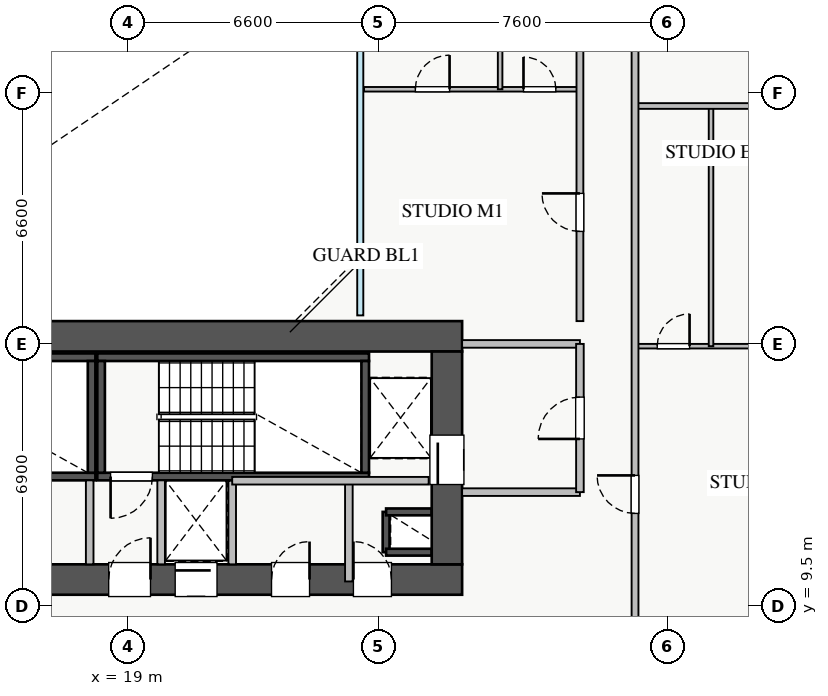
"""IFC4 building model, lengths in metres.
Left out: names, types, materials, properties, quantities, classifications, styles, units other than length and angle.
Written with IfcOpenShell. Run it as: python <this file> out.ifc"""

import sys

from ifc_helpers import new_model, si_unit, direction, frame, frame_2d, origin, place, context, subcontext, project, spatial, rectangle, extrude, source, transform, mapped, element, fill, save


model = new_model("IFC4")
c1 = context("Model", 3, precision=1e-05, world=origin(), true_north=direction((0.0, 1.0)))
c2 = subcontext(c1, "Body", "Model", "MODEL_VIEW")
j1 = project(units=[si_unit("LENGTHUNIT", "METRE"), si_unit("PLANEANGLEUNIT", "RADIAN")], contexts=[c1])
p1 = place(None, origin())
s1 = spatial("IfcSite", under=j1, at=p1, CompositionType="ELEMENT")
p2 = place(p1, origin())
s2 = spatial("IfcBuilding", under=s1, at=p2, CompositionType="ELEMENT")
p3 = place(p2, frame((0.0, 0.0, 89.25)))
s3 = spatial("IfcBuildingStorey", under=s2, at=p3, CompositionType="ELEMENT", Elevation=89.25)
p4 = place(p3, frame((25.8, 10.92, 0.0), z_axis=(0.0, 0.0, 1.0), x_axis=(0.0, 1.0, 0.0)))
e1 = element("IfcWall", 1, at=p4, inside=s3, PredefinedType="SHEAR", context=c2, shape_type="SweptSolid", body=[
    extrude(rectangle(XDim=1.06, YDim=0.18, at=frame_2d((0.53, 0.0))), origin(), (0.0, 0.0, 1.0), 3.03),
])
for number, where, z_axis, x_axis in (
    (2, (25.8, 11.98, 0.0), (0.0, 0.0, 1.0), (1.0, 0.0, 0.0)),
    (3, (25.8, 10.92, 0.0), (0.0, 0.0, 1.0), (1.0, 0.0, 0.0)),
):
    element("IfcWall", number, at=place(p3, frame(where, z_axis=z_axis, x_axis=x_axis)), inside=s3, PredefinedType="SHEAR", context=c2, shape_type="SweptSolid", body=[
        extrude(rectangle(XDim=1.2, YDim=0.18, at=frame_2d((0.6, 0.0))), origin(), (0.0, 0.0, 1.0), 3.03),
    ])
p5 = place(p3, frame((19.88, 12.8, 0.0), z_axis=(0.0, 0.0, 1.0), x_axis=(1.0, 0.0, 0.0)))
e4 = element("IfcWall", 4, at=p5, inside=s3, PredefinedType="SHEAR", context=c2, shape_type="SweptSolid", body=[
    extrude(rectangle(XDim=1.87, YDim=0.18, at=frame_2d((0.935, 0.0))), origin(), (0.0, 0.0, 1.0), 3.03),
])
p6 = place(p3, frame((11.0, 12.91, 0.0), z_axis=(0.0, 0.0, 1.0), x_axis=(1.0, 0.0, 0.0)))
e5 = element("IfcWall", 5, at=p6, inside=s3, PredefinedType="SHEAR", context=c2, shape_type="SweptSolid", body=[
    extrude(rectangle(XDim=7.15, YDim=0.2, at=frame_2d((3.575, 0.0))), origin(), (0.0, 0.0, 1.0), 3.25),
])
p7 = place(p6, frame((0.35, 0.0, 0.0)))
e6 = element("IfcOpeningElement", 6, at=p7, cuts=e5, PredefinedType="OPENING", context=c2, shape_type="SweptSolid", body=[
    extrude(rectangle(XDim=1.1, YDim=2.05, at=frame_2d((0.55, 1.025))), frame((0.0, 0.11, 0.0), z_axis=(0.0, -1.0, 0.0), x_axis=(1.0, 0.0, 0.0)), (0.0, 0.0, 1.0), 0.22),
])
p8 = place(p3, frame((11.0, 16.05, 0.0), z_axis=(0.0, 0.0, 1.0), x_axis=(1.0, 0.0, 0.0)))
e7 = element("IfcWall", 7, at=p8, inside=s3, PredefinedType="SHEAR", context=c2, shape_type="SweptSolid", body=[
    extrude(rectangle(XDim=7.15, YDim=0.2, at=frame_2d((3.575, 0.0))), origin(), (0.0, 0.0, 1.0), 3.25),
])
p9 = place(p3, frame((18.05, 13.01, 0.0), z_axis=(0.0, 0.0, 1.0), x_axis=(0.0, 1.0, 0.0)))
e8 = element("IfcWall", 8, at=p9, inside=s3, PredefinedType="SHEAR", context=c2, shape_type="SweptSolid", body=[
    extrude(rectangle(XDim=2.94, YDim=0.2, at=frame_2d((1.47, 0.0))), origin(), (0.0, 0.0, 1.0), 3.25),
])
p10 = place(p3, frame((18.2, 12.91, 0.0), z_axis=(0.0, 0.0, 1.0), x_axis=(1.0, 0.0, 0.0)))
e9 = element("IfcWall", 9, at=p10, inside=s3, PredefinedType="SHEAR", context=c2, shape_type="SweptSolid", body=[
    extrude(rectangle(XDim=7.15, YDim=0.2, at=frame_2d((3.575, 0.0))), origin(), (0.0, 0.0, 1.0), 3.25),
])
p11 = place(p10, frame((0.35, 0.0, 0.0)))
e10 = element("IfcOpeningElement", 10, at=p11, cuts=e9, PredefinedType="OPENING", context=c2, shape_type="SweptSolid", body=[
    extrude(rectangle(XDim=1.1, YDim=2.05, at=frame_2d((0.55, 1.025))), frame((0.0, 0.11, 0.0), z_axis=(0.0, -1.0, 0.0), x_axis=(1.0, 0.0, 0.0)), (0.0, 0.0, 1.0), 0.22),
])
p12 = place(p3, frame((18.2, 16.05, 0.0), z_axis=(0.0, 0.0, 1.0), x_axis=(1.0, 0.0, 0.0)))
e11 = element("IfcWall", 11, at=p12, inside=s3, PredefinedType="SHEAR", context=c2, shape_type="SweptSolid", body=[
    extrude(rectangle(XDim=7.15, YDim=0.2, at=frame_2d((3.575, 0.0))), origin(), (0.0, 0.0, 1.0), 3.25),
])
for number, where, z_axis, x_axis in (
    (12, (18.3, 13.01, 0.0), (0.0, 0.0, 1.0), (0.0, 1.0, 0.0)),
    (13, (25.25, 13.01, 0.0), (0.0, 0.0, 1.0), (0.0, 1.0, 0.0)),
):
    element("IfcWall", number, at=place(p3, frame(where, z_axis=z_axis, x_axis=x_axis)), inside=s3, PredefinedType="SHEAR", context=c2, shape_type="SweptSolid", body=[
        extrude(rectangle(XDim=2.94, YDim=0.2, at=frame_2d((1.47, 0.0))), origin(), (0.0, 0.0, 1.0), 3.25),
    ])
p13 = place(p3, frame((10.2, 10.2, 0.0), z_axis=(0.0, 0.0, 1.0), x_axis=(1.0, 0.0, 0.0)))
e14 = element("IfcWall", 14, at=p13, inside=s3, PredefinedType="SHEAR", context=c2, shape_type="SweptSolid", body=[
    extrude(rectangle(XDim=17.6, YDim=0.8, at=frame_2d((8.8, 0.0))), origin(), (0.0, 0.0, 1.0), 3.25),
])
p14 = place(p13, frame((1.15, 0.0, 0.0)))
e15 = element("IfcOpeningElement", 15, at=p14, cuts=e14, PredefinedType="OPENING", context=c2, shape_type="SweptSolid", body=[
    extrude(rectangle(XDim=1.1, YDim=2.05, at=frame_2d((0.55, 1.025))), frame((0.0, 0.41, 0.0), z_axis=(0.0, -1.0, 0.0), x_axis=(1.0, 0.0, 0.0)), (0.0, 0.0, 1.0), 0.82),
])
p15 = place(p13, frame((8.3, 0.0, 0.0)))
e16 = element("IfcOpeningElement", 16, at=p15, cuts=e14, PredefinedType="OPENING", context=c2, shape_type="SweptSolid", body=[
    extrude(rectangle(XDim=1.1, YDim=2.05, at=frame_2d((0.55, 1.025))), frame((0.0, 0.41, 0.0), z_axis=(0.0, -1.0, 0.0), x_axis=(1.0, 0.0, 0.0)), (0.0, 0.0, 1.0), 0.82),
])
p16 = place(p13, frame((10.05, 0.0, 0.0)))
e17 = element("IfcOpeningElement", 17, at=p16, cuts=e14, PredefinedType="OPENING", context=c2, shape_type="SweptSolid", body=[
    extrude(rectangle(XDim=1.1, YDim=2.05, at=frame_2d((0.55, 1.025))), frame((0.0, 0.41, 0.0), z_axis=(0.0, -1.0, 0.0), x_axis=(1.0, 0.0, 0.0)), (0.0, 0.0, 1.0), 0.82),
])
p17 = place(p13, frame((14.74, 0.0, 0.0)))
e18 = element("IfcOpeningElement", 18, at=p17, cuts=e14, PredefinedType="OPENING", context=c2, shape_type="SweptSolid", body=[
    extrude(rectangle(XDim=1.0, YDim=2.05, at=frame_2d((0.5, 1.025))), frame((0.0, 0.41, 0.0), z_axis=(0.0, -1.0, 0.0), x_axis=(1.0, 0.0, 0.0)), (0.0, 0.0, 1.0), 0.82),
])
p18 = place(p13, frame((12.585, 0.0, 0.0)))
e19 = element("IfcOpeningElement", 19, at=p18, cuts=e14, PredefinedType="OPENING", context=c2, shape_type="SweptSolid", body=[
    extrude(rectangle(XDim=1.0, YDim=2.05, at=frame_2d((0.5, 1.025))), frame((0.0, 0.41, 0.0), z_axis=(0.0, -1.0, 0.0), x_axis=(1.0, 0.0, 0.0)), (0.0, 0.0, 1.0), 0.82),
])
p19 = place(p3, frame((10.2, 16.6, 0.0), z_axis=(0.0, 0.0, 1.0), x_axis=(1.0, 0.0, 0.0)))
e20 = element("IfcWall", 20, at=p19, inside=s3, PredefinedType="SHEAR", context=c2, shape_type="SweptSolid", body=[
    extrude(rectangle(XDim=17.6, YDim=0.8, at=frame_2d((8.8, 0.0))), origin(), (0.0, 0.0, 1.0), 3.25),
])
p20 = place(p3, frame((27.4, 10.6, 0.0), z_axis=(0.0, 0.0, 1.0), x_axis=(0.0, 1.0, 0.0)))
e21 = element("IfcWall", 21, at=p20, inside=s3, PredefinedType="SHEAR", context=c2, shape_type="SweptSolid", body=[
    extrude(rectangle(XDim=5.6, YDim=0.8, at=frame_2d((2.8, 0.0))), origin(), (0.0, 0.0, 1.0), 3.25),
])
p21 = place(p20, frame((2.1, 0.0, 0.0)))
e22 = element("IfcOpeningElement", 22, at=p21, cuts=e21, PredefinedType="OPENING", context=c2, shape_type="SweptSolid", body=[
    extrude(rectangle(XDim=1.3, YDim=2.05, at=frame_2d((0.65, 1.025))), frame((0.0, 0.41, 0.0), z_axis=(0.0, -1.0, 0.0), x_axis=(1.0, 0.0, 0.0)), (0.0, 0.0, 1.0), 0.82),
])
for number, where, z_axis, x_axis in (
    (23, (27.8, 16.4, 0.0), (0.0, 0.0, 1.0), (1.0, 0.0, 0.0)),
    (24, (27.8, 12.5, 0.0), (0.0, 0.0, 1.0), (1.0, 0.0, 0.0)),
):
    element("IfcWall", number, at=place(p3, frame(where, z_axis=z_axis, x_axis=x_axis)), inside=s3, PredefinedType="PARTITIONING", context=c2, shape_type="SweptSolid", body=[
        extrude(rectangle(XDim=3.1, YDim=0.2, at=frame_2d((1.55, 0.0))), origin(), (0.0, 0.0, 1.0), 3.03),
    ])
p22 = place(p3, frame((30.9, 12.5, 0.0), z_axis=(0.0, 0.0, 1.0), x_axis=(0.0, 1.0, 0.0)))
e25 = element("IfcWall", 25, at=p22, inside=s3, PredefinedType="PARTITIONING", context=c2, shape_type="SweptSolid", body=[
    extrude(rectangle(XDim=3.9, YDim=0.2, at=frame_2d((1.95, 0.0))), origin(), (0.0, 0.0, 1.0), 3.03),
])
p23 = place(p22, frame((1.4, 0.0, 0.0)))
e26 = element("IfcOpeningElement", 26, at=p23, cuts=e25, PredefinedType="OPENING", context=c2, shape_type="SweptSolid", body=[
    extrude(rectangle(XDim=1.1, YDim=2.05, at=frame_2d((0.55, 1.025))), frame((0.0, 0.11, 0.0), z_axis=(0.0, -1.0, 0.0), x_axis=(1.0, 0.0, 0.0)), (0.0, 0.0, 1.0), 0.22),
])
for number, where, z_axis, x_axis in (
    (27, (18.0, 10.6, 0.0), (0.0, 0.0, 1.0), (0.0, 1.0, 0.0)),
    (28, (19.88, 10.6, 0.0), (0.0, 0.0, 1.0), (0.0, 1.0, 0.0)),
):
    element("IfcWall", number, at=place(p3, frame(where, z_axis=z_axis, x_axis=x_axis)), inside=s3, PredefinedType="PARTITIONING", context=c2, shape_type="SweptSolid", body=[
        extrude(rectangle(XDim=2.21, YDim=0.2, at=frame_2d((1.105, 0.0))), origin(), (0.0, 0.0, 1.0), 3.03),
    ])
p24 = place(p3, frame((24.82, 10.15, 0.0), z_axis=(0.0, 0.0, 1.0), x_axis=(0.0, 1.0, 0.0)))
e29 = element("IfcWall", 29, at=p24, inside=s3, PredefinedType="PARTITIONING", context=c2, shape_type="SweptSolid", body=[
    extrude(rectangle(XDim=2.65, YDim=0.2, at=frame_2d((1.325, 0.0))), origin(), (0.0, 0.0, 1.0), 3.03),
])
p25 = place(p3, frame((21.75, 10.6, 0.0), z_axis=(0.0, 0.0, 1.0), x_axis=(0.0, 1.0, 0.0)))
e30 = element("IfcWall", 30, at=p25, inside=s3, PredefinedType="PARTITIONING", context=c2, shape_type="SweptSolid", body=[
    extrude(rectangle(XDim=2.2, YDim=0.2, at=frame_2d((1.1, 0.0))), origin(), (0.0, 0.0, 1.0), 3.03),
])
p26 = place(p3, frame((21.75, 12.8, 0.0), z_axis=(0.0, 0.0, 1.0), x_axis=(1.0, 0.0, 0.0)))
e31 = element("IfcWall", 31, at=p26, inside=s3, PredefinedType="PARTITIONING", context=c2, shape_type="SweptSolid", body=[
    extrude(rectangle(XDim=5.17, YDim=0.2, at=frame_2d((2.585, 0.0))), origin(), (0.0, 0.0, 1.0), 3.03),
])
p27 = place(p3, frame((32.35, 16.34, 0.0), z_axis=(0.0, 0.0, 1.0), x_axis=(1.0, 0.0, 0.0)))
e32 = element("IfcWall", 32, at=p27, inside=s3, PredefinedType="PLUMBINGWALL", context=c2, shape_type="SweptSolid", body=[
    extrude(rectangle(XDim=5.4, YDim=0.12, at=frame_2d((2.7, 0.0))), origin(), (0.0, 0.0, 1.0), 3.03),
])
p28 = place(p27, frame((0.585, 0.0, 0.0)))
e33 = element("IfcOpeningElement", 33, at=p28, cuts=e32, PredefinedType="OPENING", context=c2, shape_type="SweptSolid", body=[
    extrude(rectangle(XDim=0.85, YDim=2.05, at=frame_2d((0.425, 1.025))), frame((0.0, 0.07, 0.0), z_axis=(0.0, -1.0, 0.0), x_axis=(1.0, 0.0, 0.0)), (0.0, 0.0, 1.0), 0.14),
])
p29 = place(p27, frame((3.24, 0.0, 0.0)))
e34 = element("IfcOpeningElement", 34, at=p29, cuts=e32, PredefinedType="OPENING", context=c2, shape_type="SweptSolid", body=[
    extrude(rectangle(XDim=0.9, YDim=2.05, at=frame_2d((0.45, 1.025))), frame((0.0, 0.07, 0.0), z_axis=(0.0, -1.0, 0.0), x_axis=(1.0, 0.0, 0.0)), (0.0, 0.0, 1.0), 0.14),
])
p30 = place(p3, frame((34.35, 16.34, 0.0), z_axis=(0.0, 0.0, 1.0), x_axis=(0.0, 1.0, 0.0)))
e35 = element("IfcWall", 35, at=p30, inside=s3, PredefinedType="PLUMBINGWALL", context=c2, shape_type="SweptSolid", body=[
    extrude(rectangle(XDim=6.32, YDim=0.12, at=frame_2d((3.16, 0.0))), origin(), (0.0, 0.0, 1.0), 3.03),
])
p31 = place(p3, frame((32.35, 22.66, 0.0), z_axis=(0.0, 0.0, 1.0), x_axis=(1.0, 0.0, 0.0)))
e36 = element("IfcWall", 36, at=p31, inside=s3, PredefinedType="PARTITIONING", context=c2, shape_type="SweptSolid", body=[
    extrude(rectangle(XDim=5.4, YDim=0.15, at=frame_2d((2.7, 0.0))), origin(), (0.0, 0.0, 1.0), 3.03),
])
p32 = place(p3, frame((32.35, 7.21, 0.0), z_axis=(0.0, 0.0, 1.0), x_axis=(0.0, 1.0, 0.0)))
e37 = element("IfcWall", 37, at=p32, inside=s3, PredefinedType="PARTITIONING", context=c2, shape_type="SweptSolid", body=[
    extrude(rectangle(XDim=31.23, YDim=0.18, at=frame_2d((15.615, 0.0))), origin(), (0.0, 0.0, 1.0), 2.725),
])
p33 = place(p32, frame((30.09, 0.0, 0.0)))
e38 = element("IfcOpeningElement", 38, at=p33, cuts=e37, PredefinedType="OPENING", context=c2, shape_type="SweptSolid", body=[
    extrude(rectangle(XDim=0.9, YDim=2.05, at=frame_2d((0.45, 1.025))), frame((0.0, 0.1, 0.0), z_axis=(0.0, -1.0, 0.0), x_axis=(1.0, 0.0, 0.0)), (0.0, 0.0, 1.0), 0.2),
])
p34 = place(p32, frame((0.415, 0.0, 0.0)))
e39 = element("IfcOpeningElement", 39, at=p34, cuts=e37, PredefinedType="OPENING", context=c2, shape_type="SweptSolid", body=[
    extrude(rectangle(XDim=0.9, YDim=2.05, at=frame_2d((0.45, 1.025))), frame((0.0, 0.1, 0.0), z_axis=(0.0, -1.0, 0.0), x_axis=(1.0, 0.0, 0.0)), (0.0, 0.0, 1.0), 0.2),
])
p35 = place(p32, frame((4.73, 0.0, 0.0)))
e40 = element("IfcOpeningElement", 40, at=p35, cuts=e37, PredefinedType="OPENING", context=c2, shape_type="SweptSolid", body=[
    extrude(rectangle(XDim=1.0, YDim=2.05, at=frame_2d((0.5, 1.025))), frame((0.0, 0.1, 0.0), z_axis=(0.0, -1.0, 0.0), x_axis=(1.0, 0.0, 0.0)), (0.0, 0.0, 1.0), 0.2),
])
p36 = place(p32, frame((18.655, 0.0, 0.0)))
e41 = element("IfcOpeningElement", 41, at=p36, cuts=e37, PredefinedType="OPENING", context=c2, shape_type="SweptSolid", body=[
    extrude(rectangle(XDim=1.0, YDim=2.05, at=frame_2d((0.5, 1.025))), frame((0.0, 0.1, 0.0), z_axis=(0.0, -1.0, 0.0), x_axis=(1.0, 0.0, 0.0)), (0.0, 0.0, 1.0), 0.2),
])
p37 = place(p3, frame((25.22, 23.1, 0.0), z_axis=(0.0, 0.0, 1.0), x_axis=(1.0, 0.0, 0.0)))
e42 = element("IfcWall", 42, at=p37, inside=s3, PredefinedType="PLUMBINGWALL", context=c2, shape_type="SweptSolid", body=[
    extrude(rectangle(XDim=5.68, YDim=0.12, at=frame_2d((2.84, 0.0))), origin(), (0.0, 0.0, 1.0), 3.03),
])
p38 = place(p37, frame((1.35, 0.0, 0.0)))
e43 = element("IfcOpeningElement", 43, at=p38, cuts=e42, PredefinedType="OPENING", context=c2, shape_type="SweptSolid", body=[
    extrude(rectangle(XDim=0.9, YDim=2.05, at=frame_2d((0.45, 1.025))), frame((0.0, 0.07, 0.0), z_axis=(0.0, -1.0, 0.0), x_axis=(1.0, 0.0, 0.0)), (0.0, 0.0, 1.0), 0.14),
])
p39 = place(p37, frame((4.195, 0.0, 0.0)))
e44 = element("IfcOpeningElement", 44, at=p39, cuts=e42, PredefinedType="OPENING", context=c2, shape_type="SweptSolid", body=[
    extrude(rectangle(XDim=0.85, YDim=2.05, at=frame_2d((0.425, 1.025))), frame((0.0, 0.07, 0.0), z_axis=(0.0, -1.0, 0.0), x_axis=(1.0, 0.0, 0.0)), (0.0, 0.0, 1.0), 0.14),
])
p40 = place(p3, frame((28.8, 23.1, 0.0), z_axis=(0.0, 0.0, 1.0), x_axis=(0.0, 1.0, 0.0)))
e45 = element("IfcWall", 45, at=p40, inside=s3, PredefinedType="PLUMBINGWALL", context=c2, shape_type="SweptSolid", body=[
    extrude(rectangle(XDim=5.9, YDim=0.12, at=frame_2d((2.95, 0.0))), origin(), (0.0, 0.0, 1.0), 3.03),
])
p41 = place(p3, frame((30.9, 17.0, 0.0), z_axis=(0.0, 0.0, 1.0), x_axis=(0.0, 1.0, 0.0)))
e46 = element("IfcWall", 46, at=p41, inside=s3, PredefinedType="PARTITIONING", context=c2, shape_type="SweptSolid", body=[
    extrude(rectangle(XDim=12.0, YDim=0.18, at=frame_2d((6.0, 0.0))), origin(), (0.0, 0.0, 1.0), 3.03),
])
p42 = place(p41, frame((2.36, 0.0, 0.0)))
e47 = element("IfcOpeningElement", 47, at=p42, cuts=e46, PredefinedType="OPENING", context=c2, shape_type="SweptSolid", body=[
    extrude(rectangle(XDim=1.0, YDim=2.05, at=frame_2d((0.5, 1.025))), frame((0.0, 0.1, 0.0), z_axis=(0.0, -1.0, 0.0), x_axis=(1.0, 0.0, 0.0)), (0.0, 0.0, 1.0), 0.2),
])
m1 = source(origin(), c2, "Body", "SweptSolid", [
    extrude(rectangle(XDim=1.3, YDim=2.05, at=frame_2d((0.65, 1.025))), frame((0.0, 0.025, 0.0), z_axis=(0.0, -1.0, 0.0), x_axis=(1.0, 0.0, 0.0)), (0.0, 0.0, 1.0), 0.05),
])
p43 = place(p21, origin())
e48 = element("IfcDoor", 48, at=p43, inside=s3, OperationType="SLIDING_TO_RIGHT", PredefinedType="DOOR", context=c2, shape_type="MappedRepresentation", body=[
    mapped(m1, transform((0.0, 0.0, 0.0), x_axis=(1.0, 0.0, 0.0), y_axis=(0.0, 1.0, 0.0), z_axis=(0.0, 0.0, 1.0), scale=1.0)),
])
fill(e22, e48)
m2 = source(origin(), c2, "Body", "SweptSolid", [
    extrude(rectangle(XDim=1.1, YDim=2.05, at=frame_2d((0.55, 1.025))), frame((0.0, 0.025, 0.0), z_axis=(0.0, -1.0, 0.0), x_axis=(1.0, 0.0, 0.0)), (0.0, 0.0, 1.0), 0.05),
])
p44 = place(p15, origin())
e49 = element("IfcDoor", 49, at=p44, inside=s3, OperationType="SINGLE_SWING_RIGHT", PredefinedType="DOOR", context=c2, shape_type="MappedRepresentation", body=[
    mapped(m2, transform((0.0, 0.0, 0.0), x_axis=(1.0, 0.0, 0.0), y_axis=(0.0, 1.0, 0.0), z_axis=(0.0, 0.0, 1.0), scale=1.0)),
])
fill(e16, e49)
p45 = place(p11, frame((1.1, 0.0, 0.0), z_axis=(0.0, 0.0, 1.0), x_axis=(-1.0, 0.0, 0.0)))
e50 = element("IfcDoor", 50, at=p45, inside=s3, OperationType="SINGLE_SWING_LEFT", PredefinedType="DOOR", context=c2, shape_type="MappedRepresentation", body=[
    mapped(m2, transform((0.0, 0.0, 0.0), x_axis=(1.0, 0.0, 0.0), y_axis=(0.0, 1.0, 0.0), z_axis=(0.0, 0.0, 1.0), scale=1.0)),
])
fill(e10, e50)
p46 = place(p16, origin())
e51 = element("IfcDoor", 51, at=p46, inside=s3, OperationType="SLIDING_TO_RIGHT", PredefinedType="DOOR", context=c2, shape_type="MappedRepresentation", body=[
    mapped(m2, transform((0.0, 0.0, 0.0), x_axis=(1.0, 0.0, 0.0), y_axis=(0.0, 1.0, 0.0), z_axis=(0.0, 0.0, 1.0), scale=1.0)),
])
fill(e17, e51)
m3 = source(origin(), c2, "Body", "SweptSolid", [
    extrude(rectangle(XDim=1.0, YDim=2.05, at=frame_2d((0.5, 1.025))), frame((0.0, 0.025, 0.0), z_axis=(0.0, -1.0, 0.0), x_axis=(1.0, 0.0, 0.0)), (0.0, 0.0, 1.0), 0.05),
])
p47 = place(p17, origin())
e52 = element("IfcDoor", 52, at=p47, inside=s3, OperationType="SINGLE_SWING_LEFT", PredefinedType="DOOR", context=c2, shape_type="MappedRepresentation", body=[
    mapped(m3, transform((0.0, 0.0, 0.0), x_axis=(1.0, 0.0, 0.0), y_axis=(0.0, 1.0, 0.0), z_axis=(0.0, 0.0, 1.0), scale=1.0)),
])
fill(e18, e52)
p48 = place(p18, origin())
e53 = element("IfcDoor", 53, at=p48, inside=s3, OperationType="SINGLE_SWING_RIGHT", PredefinedType="DOOR", context=c2, shape_type="MappedRepresentation", body=[
    mapped(m3, transform((0.0, 0.0, 0.0), x_axis=(1.0, 0.0, 0.0), y_axis=(0.0, 1.0, 0.0), z_axis=(0.0, 0.0, 1.0), scale=1.0)),
])
fill(e19, e53)
p49 = place(p23, origin())
e54 = element("IfcDoor", 54, at=p49, inside=s3, OperationType="SINGLE_SWING_LEFT", PredefinedType="DOOR", context=c2, shape_type="MappedRepresentation", body=[
    mapped(m2, transform((0.0, 0.0, 0.0), x_axis=(1.0, 0.0, 0.0), y_axis=(0.0, 1.0, 0.0), z_axis=(0.0, 0.0, 1.0), scale=1.0)),
])
fill(e26, e54)
m4 = source(origin(), c2, "Body", "SweptSolid", [
    extrude(rectangle(XDim=0.85, YDim=2.05, at=frame_2d((0.425, 1.025))), frame((0.0, 0.025, 0.0), z_axis=(0.0, -1.0, 0.0), x_axis=(1.0, 0.0, 0.0)), (0.0, 0.0, 1.0), 0.05),
])
p50 = place(p28, origin())
e55 = element("IfcDoor", 55, at=p50, inside=s3, OperationType="SINGLE_SWING_RIGHT", PredefinedType="DOOR", context=c2, shape_type="MappedRepresentation", body=[
    mapped(m4, transform((0.0, 0.0, 0.0), x_axis=(1.0, 0.0, 0.0), y_axis=(0.0, 1.0, 0.0), z_axis=(0.0, 0.0, 1.0), scale=1.0)),
])
fill(e33, e55)
p51 = place(p35, origin())
e56 = element("IfcDoor", 56, at=p51, inside=s3, OperationType="SINGLE_SWING_RIGHT", PredefinedType="DOOR", context=c2, shape_type="MappedRepresentation", body=[
    mapped(m3, transform((0.0, 0.0, 0.0), x_axis=(1.0, 0.0, 0.0), y_axis=(0.0, 1.0, 0.0), z_axis=(0.0, 0.0, 1.0), scale=1.0)),
])
fill(e40, e56)
m5 = source(origin(), c2, "Body", "SweptSolid", [
    extrude(rectangle(XDim=0.9, YDim=2.05, at=frame_2d((0.45, 1.025))), frame((0.0, 0.025, 0.0), z_axis=(0.0, -1.0, 0.0), x_axis=(1.0, 0.0, 0.0)), (0.0, 0.0, 1.0), 0.05),
])
p52 = place(p38, origin())
e57 = element("IfcDoor", 57, at=p52, inside=s3, OperationType="SINGLE_SWING_RIGHT", PredefinedType="DOOR", context=c2, shape_type="MappedRepresentation", body=[
    mapped(m5, transform((0.0, 0.0, 0.0), x_axis=(1.0, 0.0, 0.0), y_axis=(0.0, 1.0, 0.0), z_axis=(0.0, 0.0, 1.0), scale=1.0)),
])
fill(e43, e57)
p53 = place(p39, origin())
e58 = element("IfcDoor", 58, at=p53, inside=s3, OperationType="SINGLE_SWING_LEFT", PredefinedType="DOOR", context=c2, shape_type="MappedRepresentation", body=[
    mapped(m4, transform((0.0, 0.0, 0.0), x_axis=(1.0, 0.0, 0.0), y_axis=(0.0, 1.0, 0.0), z_axis=(0.0, 0.0, 1.0), scale=1.0)),
])
fill(e44, e58)
p54 = place(p42, origin())
e59 = element("IfcDoor", 59, at=p54, inside=s3, OperationType="SINGLE_SWING_RIGHT", PredefinedType="DOOR", context=c2, shape_type="MappedRepresentation", body=[
    mapped(m3, transform((0.0, 0.0, 0.0), x_axis=(1.0, 0.0, 0.0), y_axis=(0.0, 1.0, 0.0), z_axis=(0.0, 0.0, 1.0), scale=1.0)),
])
fill(e47, e59)
save(model, sys.argv[1])
